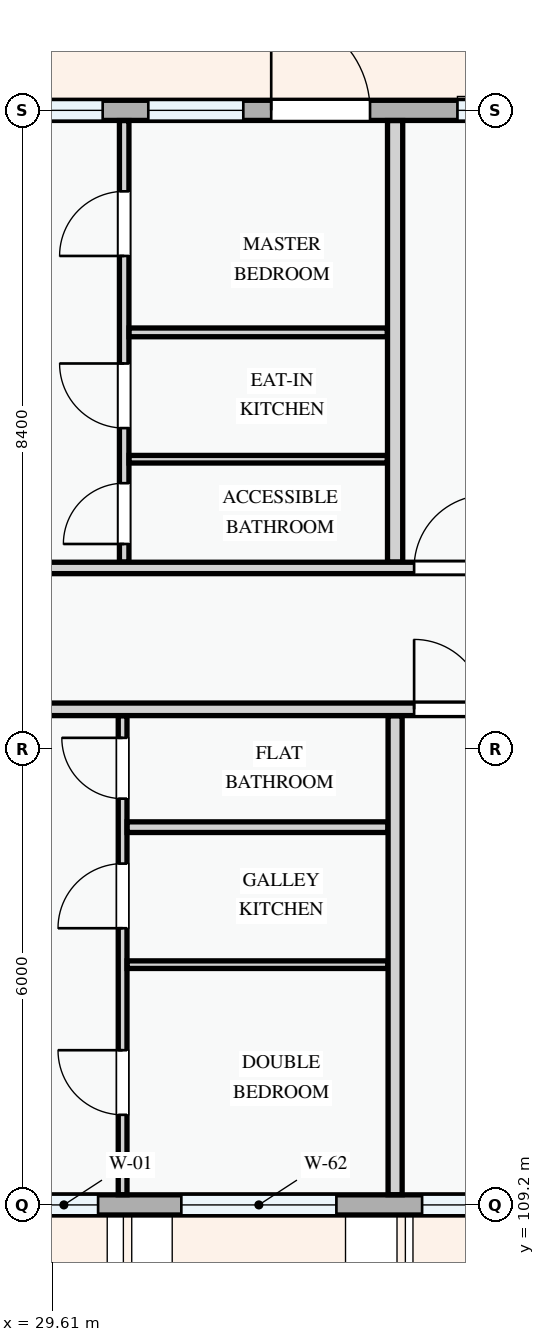
"""IFC4 building model, lengths in metres.
Left out: names, types, materials, properties, quantities, classifications, styles, units other than length and angle.
Written with IfcOpenShell. Run it as: python <this file> out.ifc"""

import sys

from ifc_helpers import new_model, si_unit, direction, frame, frame_2d, origin, place, context, subcontext, project, spatial, rectangle, extrude, element, fill, save


model = new_model("IFC4")
c1 = context("Model", 3, precision=1e-05, world=origin(), true_north=direction((0.0, 1.0)))
c2 = subcontext(c1, "Body", "Model", "MODEL_VIEW")
j1 = project(units=[si_unit("LENGTHUNIT", "METRE"), si_unit("PLANEANGLEUNIT", "RADIAN")], contexts=[c1])
p1 = place(None, origin())
s1 = spatial("IfcSite", under=j1, at=p1, CompositionType="ELEMENT")
p2 = place(p1, origin())
s2 = spatial("IfcBuilding", under=s1, at=p2, CompositionType="ELEMENT")
p3 = place(p2, frame((0.0, 0.0, 34.5)))
s3 = spatial("IfcBuildingStorey", under=s2, at=p3, CompositionType="ELEMENT", Elevation=34.5)
p4 = place(p3, frame((28.8, 109.2, 0.0), z_axis=(0.0, 0.0, 1.0), x_axis=(1.0, 0.0, 0.0)))
e1 = element("IfcWall", 1, at=p4, inside=s3, PredefinedType="STANDARD", context=c2, shape_type="SweptSolid", body=[
    extrude(rectangle(XDim=8.4, YDim=0.265, at=frame_2d((4.2, 0.0))), origin(), (0.0, 0.0, 1.0), 2.375),
])
p5 = place(p4, frame((0.512, 0.0, 0.78)))
e2 = element("IfcOpeningElement", 2, at=p5, cuts=e1, PredefinedType="OPENING", context=c2, shape_type="SweptSolid", body=[
    extrude(rectangle(XDim=0.9, YDim=1.2, at=frame_2d((0.45, 0.6))), frame((0.0, 0.143, 0.0), z_axis=(0.0, -1.0, 0.0), x_axis=(1.0, 0.0, 0.0)), (0.0, 0.0, 1.0), 0.285),
])
p6 = place(p4, frame((2.508, 0.0, 0.78)))
e3 = element("IfcOpeningElement", 3, at=p6, cuts=e1, PredefinedType="OPENING", context=c2, shape_type="SweptSolid", body=[
    extrude(rectangle(XDim=2.04, YDim=1.46, at=frame_2d((1.02, 0.73))), frame((0.0, 0.143, 0.0), z_axis=(0.0, -1.0, 0.0), x_axis=(1.0, 0.0, 0.0)), (0.0, 0.0, 1.0), 0.285),
])
p7 = place(p4, frame((5.675, 0.0, 0.78)))
e4 = element("IfcOpeningElement", 4, at=p7, cuts=e1, PredefinedType="OPENING", context=c2, shape_type="SweptSolid", body=[
    extrude(rectangle(XDim=2.18, YDim=1.48, at=frame_2d((1.09, 0.74))), frame((0.0, 0.143, 0.0), z_axis=(0.0, -1.0, 0.0), x_axis=(1.0, 0.0, 0.0)), (0.0, 0.0, 1.0), 0.285),
])
p8 = place(p3, frame((37.2, 123.6, 0.0), z_axis=(0.0, 0.0, 1.0), x_axis=(-1.0, 0.0, 0.0)))
e5 = element("IfcWall", 5, at=p8, inside=s3, PredefinedType="STANDARD", context=c2, shape_type="SweptSolid", body=[
    extrude(rectangle(XDim=8.4, YDim=0.265, at=frame_2d((4.2, 0.0))), origin(), (0.0, 0.0, 1.0), 2.345),
])
p9 = place(p8, frame((3.41, 0.0, 0.0)))
e6 = element("IfcOpeningElement", 6, at=p9, cuts=e5, PredefinedType="OPENING", context=c2, shape_type="SweptSolid", body=[
    extrude(rectangle(XDim=1.3, YDim=2.15, at=frame_2d((0.65, 1.075))), frame((0.0, 0.143, 0.0), z_axis=(0.0, -1.0, 0.0), x_axis=(1.0, 0.0, 0.0)), (0.0, 0.0, 1.0), 0.285),
])
p10 = place(p8, frame((1.01, 0.0, 0.78)))
e7 = element("IfcOpeningElement", 7, at=p10, cuts=e5, PredefinedType="OPENING", context=c2, shape_type="SweptSolid", body=[
    extrude(rectangle(XDim=1.25, YDim=1.45, at=frame_2d((0.625, 0.725))), frame((0.0, 0.143, 0.0), z_axis=(0.0, -1.0, 0.0), x_axis=(1.0, 0.0, 0.0)), (0.0, 0.0, 1.0), 0.285),
])
p11 = place(p8, frame((5.077, 0.0, 0.78)))
e8 = element("IfcOpeningElement", 8, at=p11, cuts=e5, PredefinedType="OPENING", context=c2, shape_type="SweptSolid", body=[
    extrude(rectangle(XDim=1.25, YDim=1.3, at=frame_2d((0.625, 0.65))), frame((0.0, 0.143, 0.0), z_axis=(0.0, -1.0, 0.0), x_axis=(1.0, 0.0, 0.0)), (0.0, 0.0, 1.0), 0.285),
])
p12 = place(p8, frame((6.927, 0.0, 0.78)))
e9 = element("IfcOpeningElement", 9, at=p12, cuts=e5, PredefinedType="OPENING", context=c2, shape_type="SweptSolid", body=[
    extrude(rectangle(XDim=1.0, YDim=1.25, at=frame_2d((0.5, 0.625))), frame((0.0, 0.143, 0.0), z_axis=(0.0, -1.0, 0.0), x_axis=(1.0, 0.0, 0.0)), (0.0, 0.0, 1.0), 0.285),
])
p13 = place(p3, frame((30.535, 109.334, 0.0), z_axis=(0.0, 0.0, 1.0), x_axis=(0.0, 1.0, 0.0)))
e10 = element("IfcWall", 10, at=p13, inside=s3, PredefinedType="PARTITIONING", context=c2, shape_type="SweptSolid", body=[
    extrude(rectangle(XDim=6.301, YDim=0.115, at=frame_2d((3.15, 0.0))), origin(), (0.0, 0.0, 1.0), 3.0),
])
p14 = place(p13, frame((1.051, 0.0, 0.0)))
e11 = element("IfcOpeningElement", 11, at=p14, cuts=e10, PredefinedType="OPENING", context=c2, shape_type="SweptSolid", body=[
    extrude(rectangle(XDim=0.85, YDim=2.1, at=frame_2d((0.425, 1.05))), frame((0.0, 0.067, 0.0), z_axis=(0.0, -1.0, 0.0), x_axis=(1.0, 0.0, 0.0)), (0.0, 0.0, 1.0), 0.135),
])
p15 = place(p13, frame((3.506, 0.0, 0.0)))
e12 = element("IfcOpeningElement", 12, at=p15, cuts=e10, PredefinedType="OPENING", context=c2, shape_type="SweptSolid", body=[
    extrude(rectangle(XDim=0.85, YDim=2.1, at=frame_2d((0.425, 1.05))), frame((0.0, 0.067, 0.0), z_axis=(0.0, -1.0, 0.0), x_axis=(1.0, 0.0, 0.0)), (0.0, 0.0, 1.0), 0.135),
])
p16 = place(p13, frame((5.21, 0.0, 0.0)))
e13 = element("IfcOpeningElement", 13, at=p16, cuts=e10, PredefinedType="OPENING", context=c2, shape_type="SweptSolid", body=[
    extrude(rectangle(XDim=0.8, YDim=2.1, at=frame_2d((0.4, 1.05))), frame((0.0, 0.067, 0.0), z_axis=(0.0, -1.0, 0.0), x_axis=(1.0, 0.0, 0.0)), (0.0, 0.0, 1.0), 0.135),
])
p17 = place(p3, frame((30.594, 112.361, 0.0), z_axis=(0.0, 0.0, 1.0), x_axis=(1.0, 0.0, 0.0)))
e14 = element("IfcWall", 14, at=p17, inside=s3, PredefinedType="PARTITIONING", context=c2, shape_type="SweptSolid", body=[
    extrude(rectangle(XDim=3.431, YDim=0.1, at=frame_2d((1.715, 0.0))), origin(), (0.0, 0.0, 1.0), 3.0),
])
p18 = place(p3, frame((30.594, 114.17, 0.0), z_axis=(0.0, 0.0, 1.0), x_axis=(1.0, 0.0, 0.0)))
e15 = element("IfcWall", 15, at=p18, inside=s3, PredefinedType="PARTITIONING", context=c2, shape_type="SweptSolid", body=[
    extrude(rectangle(XDim=3.431, YDim=0.14, at=frame_2d((1.715, 0.0))), origin(), (0.0, 0.0, 1.0), 3.0),
])
p19 = place(p3, frame((30.556, 117.657, 0.0), z_axis=(0.0, 0.0, 1.0), x_axis=(0.0, 1.0, 0.0)))
e16 = element("IfcWall", 16, at=p19, inside=s3, PredefinedType="PARTITIONING", context=c2, shape_type="SweptSolid", body=[
    extrude(rectangle(XDim=5.809, YDim=0.125, at=frame_2d((2.904, 0.0))), origin(), (0.0, 0.0, 1.0), 3.0),
])
p20 = place(p19, frame((0.238, 0.0, 0.0)))
e17 = element("IfcOpeningElement", 17, at=p20, cuts=e16, PredefinedType="OPENING", context=c2, shape_type="SweptSolid", body=[
    extrude(rectangle(XDim=0.8, YDim=2.1, at=frame_2d((0.4, 1.05))), frame((0.0, 0.073, 0.0), z_axis=(0.0, -1.0, 0.0), x_axis=(1.0, 0.0, 0.0)), (0.0, 0.0, 1.0), 0.145),
])
p21 = place(p19, frame((1.763, 0.0, 0.0)))
e18 = element("IfcOpeningElement", 18, at=p21, cuts=e16, PredefinedType="OPENING", context=c2, shape_type="SweptSolid", body=[
    extrude(rectangle(XDim=0.85, YDim=2.1, at=frame_2d((0.425, 1.05))), frame((0.0, 0.073, 0.0), z_axis=(0.0, -1.0, 0.0), x_axis=(1.0, 0.0, 0.0)), (0.0, 0.0, 1.0), 0.145),
])
p22 = place(p19, frame((4.028, 0.0, 0.0)))
e19 = element("IfcOpeningElement", 19, at=p22, cuts=e16, PredefinedType="OPENING", context=c2, shape_type="SweptSolid", body=[
    extrude(rectangle(XDim=0.85, YDim=2.1, at=frame_2d((0.425, 1.05))), frame((0.0, 0.073, 0.0), z_axis=(0.0, -1.0, 0.0), x_axis=(1.0, 0.0, 0.0)), (0.0, 0.0, 1.0), 0.145),
])
p23 = place(p3, frame((30.62, 120.679, 0.0), z_axis=(0.0, 0.0, 1.0), x_axis=(1.0, 0.0, 0.0)))
e20 = element("IfcWall", 20, at=p23, inside=s3, PredefinedType="PARTITIONING", context=c2, shape_type="SweptSolid", body=[
    extrude(rectangle(XDim=3.398, YDim=0.115, at=frame_2d((1.699, 0.0))), origin(), (0.0, 0.0, 1.0), 3.0),
])
p24 = place(p3, frame((30.62, 119.01, 0.0), z_axis=(0.0, 0.0, 1.0), x_axis=(1.0, 0.0, 0.0)))
e21 = element("IfcWall", 21, at=p24, inside=s3, PredefinedType="PARTITIONING", context=c2, shape_type="SweptSolid", body=[
    extrude(rectangle(XDim=3.398, YDim=0.1, at=frame_2d((1.699, 0.0))), origin(), (0.0, 0.0, 1.0), 3.0),
])
p25 = place(p3, frame((34.12, 109.334, 0.0), z_axis=(0.0, 0.0, 1.0), x_axis=(0.0, 1.0, 0.0)))
e22 = element("IfcWall", 22, at=p25, inside=s3, PredefinedType="PARTITIONING", context=c2, shape_type="SweptSolid", body=[
    extrude(rectangle(XDim=6.301, YDim=0.185, at=frame_2d((3.15, 0.0))), origin(), (0.0, 0.0, 1.0), 3.0),
])
p26 = place(p3, frame((34.12, 117.657, 0.0), z_axis=(0.0, 0.0, 1.0), x_axis=(0.0, 1.0, 0.0)))
e23 = element("IfcWall", 23, at=p26, inside=s3, PredefinedType="PARTITIONING", context=c2, shape_type="SweptSolid", body=[
    extrude(rectangle(XDim=5.809, YDim=0.2, at=frame_2d((2.904, 0.0))), origin(), (0.0, 0.0, 1.0), 3.0),
])
p27 = place(p3, frame((25.15, 115.72, 0.0), z_axis=(0.0, 0.0, 1.0), x_axis=(1.0, 0.0, 0.0)))
e24 = element("IfcWall", 24, at=p27, inside=s3, PredefinedType="PARTITIONING", context=c2, shape_type="SweptSolid", body=[
    extrude(rectangle(XDim=26.316, YDim=0.165, at=frame_2d((13.158, 0.0))), origin(), (0.0, 0.0, 1.0), 3.0),
])
p28 = place(p27, frame((0.25, 0.0, 0.0)))
e25 = element("IfcOpeningElement", 25, at=p28, cuts=e24, PredefinedType="OPENING", context=c2, shape_type="SweptSolid", body=[
    extrude(rectangle(XDim=0.92, YDim=2.1, at=frame_2d((0.46, 1.05))), frame((0.0, 0.093, 0.0), z_axis=(0.0, -1.0, 0.0), x_axis=(1.0, 0.0, 0.0)), (0.0, 0.0, 1.0), 0.185),
])
p29 = place(p27, frame((9.22, 0.0, 0.0)))
e26 = element("IfcOpeningElement", 26, at=p29, cuts=e24, PredefinedType="OPENING", context=c2, shape_type="SweptSolid", body=[
    extrude(rectangle(XDim=0.92, YDim=2.1, at=frame_2d((0.46, 1.05))), frame((0.0, 0.093, 0.0), z_axis=(0.0, -1.0, 0.0), x_axis=(1.0, 0.0, 0.0)), (0.0, 0.0, 1.0), 0.185),
])
p30 = place(p27, frame((20.11, 0.0, 0.0)))
e27 = element("IfcOpeningElement", 27, at=p30, cuts=e24, PredefinedType="OPENING", context=c2, shape_type="SweptSolid", body=[
    extrude(rectangle(XDim=0.92, YDim=2.1, at=frame_2d((0.46, 1.05))), frame((0.0, 0.093, 0.0), z_axis=(0.0, -1.0, 0.0), x_axis=(1.0, 0.0, 0.0)), (0.0, 0.0, 1.0), 0.185),
])
p31 = place(p3, frame((22.66, 117.58, 0.0), z_axis=(0.0, 0.0, 1.0), x_axis=(1.0, 0.0, 0.0)))
e28 = element("IfcWall", 28, at=p31, inside=s3, PredefinedType="PARTITIONING", context=c2, shape_type="SweptSolid", body=[
    extrude(rectangle(XDim=28.806, YDim=0.15, at=frame_2d((14.403, 0.0))), origin(), (0.0, 0.0, 1.0), 3.0),
])
p32 = place(p31, frame((2.74, 0.0, 0.0)))
e29 = element("IfcOpeningElement", 29, at=p32, cuts=e28, PredefinedType="OPENING", context=c2, shape_type="SweptSolid", body=[
    extrude(rectangle(XDim=0.92, YDim=2.1, at=frame_2d((0.46, 1.05))), frame((0.0, 0.085, 0.0), z_axis=(0.0, -1.0, 0.0), x_axis=(1.0, 0.0, 0.0)), (0.0, 0.0, 1.0), 0.17),
])
p33 = place(p31, frame((11.71, 0.0, 0.0)))
e30 = element("IfcOpeningElement", 30, at=p33, cuts=e28, PredefinedType="OPENING", context=c2, shape_type="SweptSolid", body=[
    extrude(rectangle(XDim=0.96, YDim=2.12, at=frame_2d((0.48, 1.06))), frame((0.0, 0.085, 0.0), z_axis=(0.0, -1.0, 0.0), x_axis=(1.0, 0.0, 0.0)), (0.0, 0.0, 1.0), 0.17),
])
p34 = place(p31, frame((22.397, 0.0, 0.0)))
e31 = element("IfcOpeningElement", 31, at=p34, cuts=e28, PredefinedType="OPENING", context=c2, shape_type="SweptSolid", body=[
    extrude(rectangle(XDim=0.92, YDim=2.1, at=frame_2d((0.46, 1.05))), frame((0.0, 0.085, 0.0), z_axis=(0.0, -1.0, 0.0), x_axis=(1.0, 0.0, 0.0)), (0.0, 0.0, 1.0), 0.17),
])
p35 = place(p5, origin())
e32 = element("IfcWindow", 32, at=p35, inside=s3, PartitioningType="SINGLE_PANEL", PredefinedType="WINDOW", context=c2, shape_type="SweptSolid", body=[
    extrude(rectangle(XDim=0.9, YDim=1.2, at=frame_2d((0.45, 0.6))), frame((0.0, 0.03, 0.0), z_axis=(0.0, -1.0, 0.0), x_axis=(1.0, 0.0, 0.0)), (0.0, 0.0, 1.0), 0.06),
])
fill(e2, e32)
p36 = place(p6, origin())
e33 = element("IfcWindow", 33, at=p36, inside=s3, PartitioningType="DOUBLE_PANEL_VERTICAL", PredefinedType="WINDOW", context=c2, shape_type="SweptSolid", body=[
    extrude(rectangle(XDim=2.04, YDim=1.46, at=frame_2d((1.02, 0.73))), frame((0.0, 0.03, 0.0), z_axis=(0.0, -1.0, 0.0), x_axis=(1.0, 0.0, 0.0)), (0.0, 0.0, 1.0), 0.06),
])
fill(e3, e33)
p37 = place(p7, origin())
e34 = element("IfcWindow", 34, at=p37, inside=s3, PartitioningType="DOUBLE_PANEL_VERTICAL", PredefinedType="WINDOW", context=c2, shape_type="SweptSolid", body=[
    extrude(rectangle(XDim=2.18, YDim=1.48, at=frame_2d((1.09, 0.74))), frame((0.0, 0.03, 0.0), z_axis=(0.0, -1.0, 0.0), x_axis=(1.0, 0.0, 0.0)), (0.0, 0.0, 1.0), 0.06),
])
fill(e4, e34)
p38 = place(p9, frame((1.3, 0.0, 0.0), z_axis=(0.0, 0.0, 1.0), x_axis=(-1.0, 0.0, 0.0)))
e35 = element("IfcDoor", 35, at=p38, inside=s3, OperationType="SINGLE_SWING_LEFT", PredefinedType="DOOR", context=c2, shape_type="SweptSolid", body=[
    extrude(rectangle(XDim=1.3, YDim=2.15, at=frame_2d((0.65, 1.075))), frame((0.0, 0.025, 0.0), z_axis=(0.0, -1.0, 0.0), x_axis=(1.0, 0.0, 0.0)), (0.0, 0.0, 1.0), 0.05),
])
fill(e6, e35)
p39 = place(p10, origin())
e36 = element("IfcWindow", 36, at=p39, inside=s3, PartitioningType="SINGLE_PANEL", PredefinedType="WINDOW", context=c2, shape_type="SweptSolid", body=[
    extrude(rectangle(XDim=1.25, YDim=1.45, at=frame_2d((0.625, 0.725))), frame((0.0, 0.03, 0.0), z_axis=(0.0, -1.0, 0.0), x_axis=(1.0, 0.0, 0.0)), (0.0, 0.0, 1.0), 0.06),
])
fill(e7, e36)
p40 = place(p11, origin())
e37 = element("IfcWindow", 37, at=p40, inside=s3, PartitioningType="SINGLE_PANEL", PredefinedType="WINDOW", context=c2, shape_type="SweptSolid", body=[
    extrude(rectangle(XDim=1.25, YDim=1.3, at=frame_2d((0.625, 0.65))), frame((0.0, 0.03, 0.0), z_axis=(0.0, -1.0, 0.0), x_axis=(1.0, 0.0, 0.0)), (0.0, 0.0, 1.0), 0.06),
])
fill(e8, e37)
p41 = place(p12, origin())
e38 = element("IfcWindow", 38, at=p41, inside=s3, PartitioningType="SINGLE_PANEL", PredefinedType="WINDOW", context=c2, shape_type="SweptSolid", body=[
    extrude(rectangle(XDim=1.0, YDim=1.25, at=frame_2d((0.5, 0.625))), frame((0.0, 0.03, 0.0), z_axis=(0.0, -1.0, 0.0), x_axis=(1.0, 0.0, 0.0)), (0.0, 0.0, 1.0), 0.06),
])
fill(e9, e38)
p42 = place(p14, origin())
e39 = element("IfcDoor", 39, at=p42, inside=s3, OperationType="SINGLE_SWING_RIGHT", PredefinedType="DOOR", context=c2, shape_type="SweptSolid", body=[
    extrude(rectangle(XDim=0.85, YDim=2.1, at=frame_2d((0.425, 1.05))), frame((0.0, 0.025, 0.0), z_axis=(0.0, -1.0, 0.0), x_axis=(1.0, 0.0, 0.0)), (0.0, 0.0, 1.0), 0.05),
])
fill(e11, e39)
p43 = place(p15, origin())
e40 = element("IfcDoor", 40, at=p43, inside=s3, OperationType="SINGLE_SWING_LEFT", PredefinedType="DOOR", context=c2, shape_type="SweptSolid", body=[
    extrude(rectangle(XDim=0.85, YDim=2.1, at=frame_2d((0.425, 1.05))), frame((0.0, 0.025, 0.0), z_axis=(0.0, -1.0, 0.0), x_axis=(1.0, 0.0, 0.0)), (0.0, 0.0, 1.0), 0.05),
])
fill(e12, e40)
p44 = place(p16, origin())
e41 = element("IfcDoor", 41, at=p44, inside=s3, OperationType="SINGLE_SWING_RIGHT", PredefinedType="DOOR", context=c2, shape_type="SweptSolid", body=[
    extrude(rectangle(XDim=0.8, YDim=2.1, at=frame_2d((0.4, 1.05))), frame((0.0, 0.025, 0.0), z_axis=(0.0, -1.0, 0.0), x_axis=(1.0, 0.0, 0.0)), (0.0, 0.0, 1.0), 0.05),
])
fill(e13, e41)
p45 = place(p20, origin())
e42 = element("IfcDoor", 42, at=p45, inside=s3, OperationType="SINGLE_SWING_LEFT", PredefinedType="DOOR", context=c2, shape_type="SweptSolid", body=[
    extrude(rectangle(XDim=0.8, YDim=2.1, at=frame_2d((0.4, 1.05))), frame((0.0, 0.025, 0.0), z_axis=(0.0, -1.0, 0.0), x_axis=(1.0, 0.0, 0.0)), (0.0, 0.0, 1.0), 0.05),
])
fill(e17, e42)
p46 = place(p21, origin())
e43 = element("IfcDoor", 43, at=p46, inside=s3, OperationType="SINGLE_SWING_RIGHT", PredefinedType="DOOR", context=c2, shape_type="SweptSolid", body=[
    extrude(rectangle(XDim=0.85, YDim=2.1, at=frame_2d((0.425, 1.05))), frame((0.0, 0.025, 0.0), z_axis=(0.0, -1.0, 0.0), x_axis=(1.0, 0.0, 0.0)), (0.0, 0.0, 1.0), 0.05),
])
fill(e18, e43)
p47 = place(p22, origin())
e44 = element("IfcDoor", 44, at=p47, inside=s3, OperationType="SINGLE_SWING_LEFT", PredefinedType="DOOR", context=c2, shape_type="SweptSolid", body=[
    extrude(rectangle(XDim=0.85, YDim=2.1, at=frame_2d((0.425, 1.05))), frame((0.0, 0.025, 0.0), z_axis=(0.0, -1.0, 0.0), x_axis=(1.0, 0.0, 0.0)), (0.0, 0.0, 1.0), 0.05),
])
fill(e19, e44)
p48 = place(p29, origin())
e45 = element("IfcDoor", 45, at=p48, inside=s3, OperationType="SINGLE_SWING_LEFT", PredefinedType="DOOR", context=c2, shape_type="SweptSolid", body=[
    extrude(rectangle(XDim=0.92, YDim=2.1, at=frame_2d((0.46, 1.05))), frame((0.0, 0.025, 0.0), z_axis=(0.0, -1.0, 0.0), x_axis=(1.0, 0.0, 0.0)), (0.0, 0.0, 1.0), 0.05),
])
fill(e26, e45)
p49 = place(p33, origin())
e46 = element("IfcDoor", 46, at=p49, inside=s3, OperationType="SINGLE_SWING_RIGHT", PredefinedType="DOOR", context=c2, shape_type="SweptSolid", body=[
    extrude(rectangle(XDim=0.96, YDim=2.12, at=frame_2d((0.48, 1.06))), frame((0.0, 0.025, 0.0), z_axis=(0.0, -1.0, 0.0), x_axis=(1.0, 0.0, 0.0)), (0.0, 0.0, 1.0), 0.05),
])
fill(e30, e46)
save(model, sys.argv[1])
